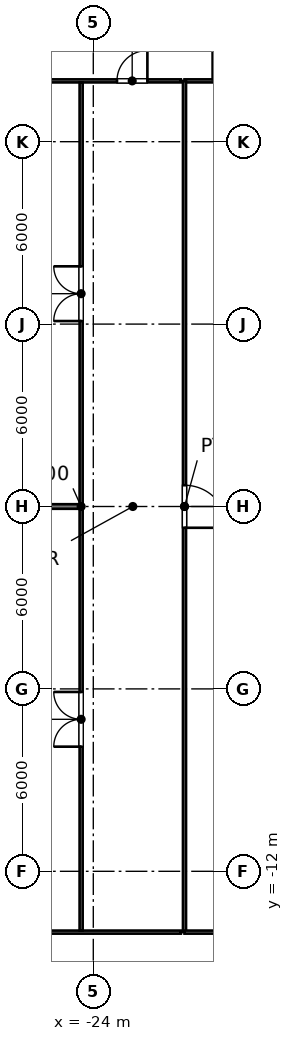
"""IFC4 building model, lengths in metres.
Left out: names, types, materials, properties, quantities, classifications, styles, units other than length and angle.
Written with IfcOpenShell. Run it as: python <this file> out.ifc"""

import sys

from ifc_helpers import new_model, si_unit, direction, frame, frame_2d, origin, place, context, subcontext, project, spatial, rectangle, extrude, element, fill, save


model = new_model("IFC4")
c1 = context("Model", 3, precision=1e-05, world=origin(), true_north=direction((0.0, 1.0)))
c2 = subcontext(c1, "Body", "Model", "MODEL_VIEW")
j1 = project(units=[si_unit("LENGTHUNIT", "METRE"), si_unit("PLANEANGLEUNIT", "RADIAN")], contexts=[c1])
p1 = place(None, origin())
s1 = spatial("IfcSite", under=j1, at=p1, CompositionType="ELEMENT")
p2 = place(p1, origin())
s2 = spatial("IfcBuilding", under=s1, at=p2, CompositionType="ELEMENT")
p3 = place(p2, origin())
s3 = spatial("IfcBuildingStorey", under=s2, at=p3, CompositionType="ELEMENT", Elevation=0.0)
p4 = place(p3, frame((-15.0, 14.0, 0.0), z_axis=(0.0, 0.0, 1.0), x_axis=(-1.0, 0.0, 0.0)))
e1 = element("IfcWall", 1, at=p4, inside=s3, PredefinedType="PARTITIONING", context=c2, shape_type="SweptSolid", body=[
    extrude(rectangle(XDim=6.0, YDim=0.1, at=frame_2d((3.0, 0.0))), origin(), (0.0, 0.0, 1.0), 6.945),
])
p5 = place(p3, frame((-21.0, 14.0, 0.0), z_axis=(0.0, 0.0, 1.0), x_axis=(0.0, -1.0, 0.0)))
e2 = element("IfcWall", 2, at=p5, inside=s3, PredefinedType="PARTITIONING", context=c2, shape_type="SweptSolid", body=[
    extrude(rectangle(XDim=28.0, YDim=0.1, at=frame_2d((14.0, 0.0))), origin(), (0.0, 0.0, 1.0), 6.877),
])
p6 = place(p5, frame((13.3, 0.0, 0.0)))
e3 = element("IfcOpeningElement", 3, at=p6, cuts=e2, PredefinedType="OPENING", context=c2, shape_type="SweptSolid", body=[
    extrude(rectangle(XDim=1.4, YDim=2.1, at=frame_2d((0.7, 1.05))), frame((0.0, 0.05, 0.0), z_axis=(0.0, -1.0, 0.0), x_axis=(1.0, 0.0, 0.0)), (0.0, 0.0, 1.0), 0.1),
])
p7 = place(p3, frame((-21.0, -14.0, 0.0), z_axis=(0.0, 0.0, 1.0), x_axis=(1.0, 0.0, 0.0)))
e4 = element("IfcWall", 4, at=p7, inside=s3, PredefinedType="PARTITIONING", context=c2, shape_type="SweptSolid", body=[
    extrude(rectangle(XDim=6.0, YDim=0.1, at=frame_2d((3.0, 0.0))), origin(), (0.0, 0.0, 1.0), 6.945),
])
p8 = place(p3, frame((-21.121, 14.0, 0.0), z_axis=(0.0, 0.0, 1.0), x_axis=(-1.0, 0.0, 0.0)))
e5 = element("IfcWall", 5, at=p8, inside=s3, PredefinedType="PARTITIONING", context=c2, shape_type="SweptSolid", body=[
    extrude(rectangle(XDim=25.9, YDim=0.1, at=frame_2d((12.95, 0.0))), origin(), (0.0, 0.0, 1.0), 6.868),
])
p9 = place(p8, frame((1.1, 0.0, 0.0)))
e6 = element("IfcOpeningElement", 6, at=p9, cuts=e5, PredefinedType="OPENING", context=c2, shape_type="SweptSolid", body=[
    extrude(rectangle(XDim=1.0, YDim=2.1, at=frame_2d((0.5, 1.05))), frame((0.0, 0.05, 0.0), z_axis=(0.0, -1.0, 0.0), x_axis=(1.0, 0.0, 0.0)), (0.0, 0.0, 1.0), 0.1),
])
p10 = place(p3, frame((-21.121, -14.0, 0.0), z_axis=(0.0, 0.0, 1.0), x_axis=(-1.0, 0.0, 0.0)))
e7 = element("IfcWall", 7, at=p10, inside=s3, PredefinedType="PARTITIONING", context=c2, shape_type="SweptSolid", body=[
    extrude(rectangle(XDim=25.9, YDim=0.1, at=frame_2d((12.95, 0.0))), origin(), (0.0, 0.0, 1.0), 6.868),
])
p11 = place(p3, frame((-24.4, 13.95, 0.0), z_axis=(0.0, 0.0, 1.0), x_axis=(0.0, -1.0, 0.0)))
e8 = element("IfcWall", 8, at=p11, inside=s3, PredefinedType="PARTITIONING", context=c2, shape_type="SweptSolid", body=[
    extrude(rectangle(XDim=27.9, YDim=0.1, at=frame_2d((13.95, 0.0))), origin(), (0.0, 0.0, 1.0), 6.877),
])
p12 = place(p11, frame((6.05, 0.0, 0.0)))
e9 = element("IfcOpeningElement", 9, at=p12, cuts=e8, PredefinedType="OPENING", context=c2, shape_type="SweptSolid", body=[
    extrude(rectangle(XDim=1.8, YDim=2.1, at=frame_2d((0.9, 1.05))), frame((0.0, 0.05, 0.0), z_axis=(0.0, -1.0, 0.0), x_axis=(1.0, 0.0, 0.0)), (0.0, 0.0, 1.0), 0.1),
])
p13 = place(p11, frame((20.05, 0.0, 0.0)))
e10 = element("IfcOpeningElement", 10, at=p13, cuts=e8, PredefinedType="OPENING", context=c2, shape_type="SweptSolid", body=[
    extrude(rectangle(XDim=1.8, YDim=2.1, at=frame_2d((0.9, 1.05))), frame((0.0, 0.05, 0.0), z_axis=(0.0, -1.0, 0.0), x_axis=(1.0, 0.0, 0.0)), (0.0, 0.0, 1.0), 0.1),
])
p14 = place(p3, frame((-49.65, 0.0, 0.0), z_axis=(0.0, 0.0, 1.0), x_axis=(1.0, 0.0, 0.0)))
e11 = element("IfcWall", 11, at=p14, inside=s3, PredefinedType="PARTITIONING", context=c2, shape_type="SweptSolid", body=[
    extrude(rectangle(XDim=25.2, YDim=0.15, at=frame_2d((12.6, 0.0))), origin(), (0.0, 0.0, 1.0), 6.877),
])
p15 = place(p3, frame((-20.0, 14.05, 0.0), z_axis=(0.0, 0.0, 1.0), x_axis=(0.0, 1.0, 0.0)))
e12 = element("IfcWall", 12, at=p15, inside=s3, PredefinedType="PARTITIONING", context=c2, shape_type="SweptSolid", body=[
    extrude(rectangle(XDim=5.275, YDim=0.15, at=frame_2d((2.637, 0.0))), origin(), (0.0, 0.0, 1.0), 6.868),
])
p16 = place(p6, origin())
e13 = element("IfcDoor", 13, at=p16, inside=s3, OperationType="SINGLE_SWING_RIGHT", PredefinedType="DOOR", context=c2, shape_type="SweptSolid", body=[
    extrude(rectangle(XDim=1.4, YDim=2.1, at=frame_2d((0.7, 1.05))), frame((0.0, 0.025, 0.0), z_axis=(0.0, -1.0, 0.0), x_axis=(1.0, 0.0, 0.0)), (0.0, 0.0, 1.0), 0.05),
])
fill(e3, e13)
p17 = place(p12, origin())
e14 = element("IfcDoor", 14, at=p17, inside=s3, OperationType="DOUBLE_DOOR_SINGLE_SWING", PredefinedType="DOOR", context=c2, shape_type="SweptSolid", body=[
    extrude(rectangle(XDim=1.8, YDim=2.1, at=frame_2d((0.9, 1.05))), frame((0.0, 0.025, 0.0), z_axis=(0.0, -1.0, 0.0), x_axis=(1.0, 0.0, 0.0)), (0.0, 0.0, 1.0), 0.05),
])
fill(e9, e14)
p18 = place(p13, origin())
e15 = element("IfcDoor", 15, at=p18, inside=s3, OperationType="DOUBLE_DOOR_SINGLE_SWING", PredefinedType="DOOR", context=c2, shape_type="SweptSolid", body=[
    extrude(rectangle(XDim=1.8, YDim=2.1, at=frame_2d((0.9, 1.05))), frame((0.0, 0.025, 0.0), z_axis=(0.0, -1.0, 0.0), x_axis=(1.0, 0.0, 0.0)), (0.0, 0.0, 1.0), 0.05),
])
fill(e10, e15)
p19 = place(p9, origin())
e16 = element("IfcDoor", 16, at=p19, inside=s3, OperationType="SINGLE_SWING_LEFT", PredefinedType="DOOR", context=c2, shape_type="SweptSolid", body=[
    extrude(rectangle(XDim=1.0, YDim=2.1, at=frame_2d((0.5, 1.05))), frame((0.0, 0.025, 0.0), z_axis=(0.0, -1.0, 0.0), x_axis=(1.0, 0.0, 0.0)), (0.0, 0.0, 1.0), 0.05),
])
fill(e6, e16)
save(model, sys.argv[1])
